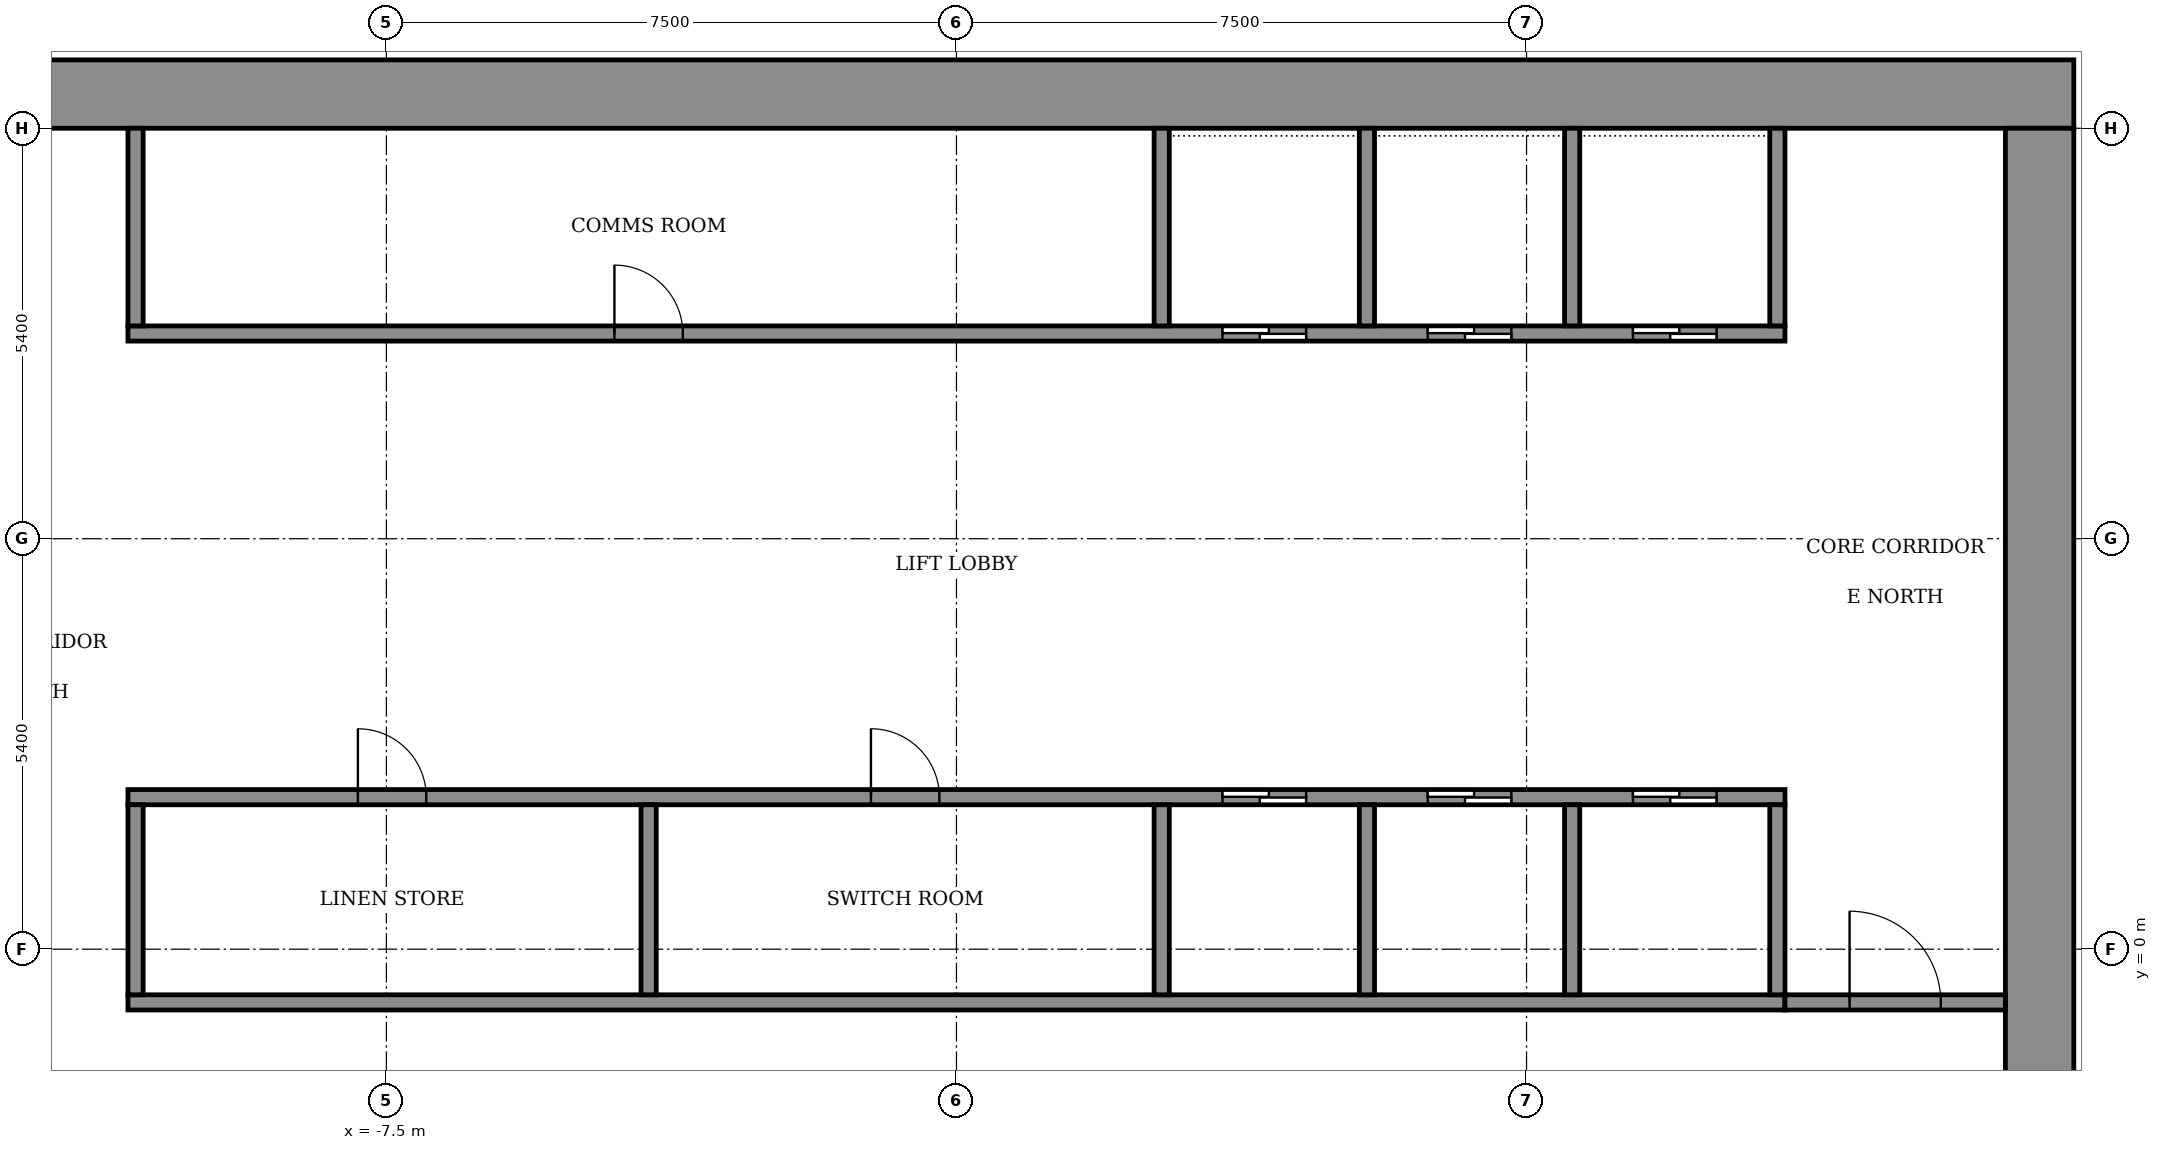
"""IFC4 building model, lengths in metres.
Left out: names, types, materials, properties, quantities, classifications, styles, units other than length and angle.
Written with IfcOpenShell. Run it as: python <this file> out.ifc"""

import sys

from ifc_helpers import new_model, si_unit, direction, frame, frame_2d, origin, place, context, subcontext, project, spatial, rectangle, extrude, element, fill, save


model = new_model("IFC4")
c1 = context("Model", 3, precision=1e-05, world=origin(), true_north=direction((0.0, 1.0)))
c2 = subcontext(c1, "Body", "Model", "MODEL_VIEW")
j1 = project(units=[si_unit("LENGTHUNIT", "METRE"), si_unit("PLANEANGLEUNIT", "RADIAN")], contexts=[c1])
p1 = place(None, origin())
s1 = spatial("IfcSite", under=j1, at=p1, CompositionType="ELEMENT")
p2 = place(p1, origin())
s2 = spatial("IfcBuilding", under=s1, at=p2, CompositionType="ELEMENT")
p3 = place(p2, frame((0.0, 0.0, 186.1)))
s3 = spatial("IfcBuildingStorey", under=s2, at=p3, CompositionType="ELEMENT", Elevation=186.1)
p4 = place(p3, frame((-14.7, 11.25, 0.0), z_axis=(0.0, 0.0, 1.0), x_axis=(1.0, 0.0, 0.0)))
e1 = element("IfcWall", 1, at=p4, inside=s3, PredefinedType="SHEAR", context=c2, shape_type="SweptSolid", body=[
    extrude(rectangle(XDim=29.4, YDim=0.9, at=frame_2d((14.7, 0.0))), origin(), (0.0, 0.0, 1.0), 3.6),
])
p5 = place(p3, frame((14.25, -10.8, 0.0), z_axis=(0.0, 0.0, 1.0), x_axis=(0.0, 1.0, 0.0)))
e2 = element("IfcWall", 2, at=p5, inside=s3, PredefinedType="SHEAR", context=c2, shape_type="SweptSolid", body=[
    extrude(rectangle(XDim=21.6, YDim=0.9, at=frame_2d((10.8, 0.0))), origin(), (0.0, 0.0, 1.0), 3.6),
])
p6 = place(p5, frame((1.2, 0.0, 0.0)))
e3 = element("IfcOpeningElement", 3, at=p6, cuts=e2, PredefinedType="OPENING", context=c2, shape_type="SweptSolid", body=[
    extrude(rectangle(XDim=1.2, YDim=2.1, at=frame_2d((0.6, 1.05))), frame((0.0, 0.46, 0.0), z_axis=(0.0, -1.0, 0.0), x_axis=(1.0, 0.0, 0.0)), (0.0, 0.0, 1.0), 0.92),
])
p7 = place(p3, frame((-10.9, -0.7, 0.0), z_axis=(0.0, 0.0, 1.0), x_axis=(1.0, 0.0, 0.0)))
e4 = element("IfcWall", 4, at=p7, inside=s3, PredefinedType="SHEAR", context=c2, shape_type="SweptSolid", body=[
    extrude(rectangle(XDim=21.8, YDim=0.2, at=frame_2d((10.9, 0.0))), origin(), (0.0, 0.0, 1.0), 3.05),
])
p8 = place(p3, frame((-10.9, 2.0, 0.0), z_axis=(0.0, 0.0, 1.0), x_axis=(1.0, 0.0, 0.0)))
e5 = element("IfcWall", 5, at=p8, inside=s3, PredefinedType="SHEAR", context=c2, shape_type="SweptSolid", body=[
    extrude(rectangle(XDim=21.8, YDim=0.2, at=frame_2d((10.9, 0.0))), origin(), (0.0, 0.0, 1.0), 3.05),
])
p9 = place(p8, frame((14.4, 0.0, 0.0)))
e6 = element("IfcOpeningElement", 6, at=p9, cuts=e5, PredefinedType="OPENING", context=c2, shape_type="SweptSolid", body=[
    extrude(rectangle(XDim=1.1, YDim=2.1, at=frame_2d((0.55, 1.05))), frame((0.0, 0.11, 0.0), z_axis=(0.0, -1.0, 0.0), x_axis=(1.0, 0.0, 0.0)), (0.0, 0.0, 1.0), 0.22),
])
p10 = place(p8, frame((17.1, 0.0, 0.0)))
e7 = element("IfcOpeningElement", 7, at=p10, cuts=e5, PredefinedType="OPENING", context=c2, shape_type="SweptSolid", body=[
    extrude(rectangle(XDim=1.1, YDim=2.1, at=frame_2d((0.55, 1.05))), frame((0.0, 0.11, 0.0), z_axis=(0.0, -1.0, 0.0), x_axis=(1.0, 0.0, 0.0)), (0.0, 0.0, 1.0), 0.22),
])
p11 = place(p8, frame((19.8, 0.0, 0.0)))
e8 = element("IfcOpeningElement", 8, at=p11, cuts=e5, PredefinedType="OPENING", context=c2, shape_type="SweptSolid", body=[
    extrude(rectangle(XDim=1.1, YDim=2.1, at=frame_2d((0.55, 1.05))), frame((0.0, 0.11, 0.0), z_axis=(0.0, -1.0, 0.0), x_axis=(1.0, 0.0, 0.0)), (0.0, 0.0, 1.0), 0.22),
])
p12 = place(p8, frame((3.025, 0.0, 0.0)))
e9 = element("IfcOpeningElement", 9, at=p12, cuts=e5, PredefinedType="OPENING", context=c2, shape_type="SweptSolid", body=[
    extrude(rectangle(XDim=0.9, YDim=2.1, at=frame_2d((0.45, 1.05))), frame((0.0, 0.11, 0.0), z_axis=(0.0, -1.0, 0.0), x_axis=(1.0, 0.0, 0.0)), (0.0, 0.0, 1.0), 0.22),
])
p13 = place(p8, frame((9.775, 0.0, 0.0)))
e10 = element("IfcOpeningElement", 10, at=p13, cuts=e5, PredefinedType="OPENING", context=c2, shape_type="SweptSolid", body=[
    extrude(rectangle(XDim=0.9, YDim=2.1, at=frame_2d((0.45, 1.05))), frame((0.0, 0.11, 0.0), z_axis=(0.0, -1.0, 0.0), x_axis=(1.0, 0.0, 0.0)), (0.0, 0.0, 1.0), 0.22),
])
p14 = place(p3, frame((-10.9, 8.1, 0.0), z_axis=(0.0, 0.0, 1.0), x_axis=(1.0, 0.0, 0.0)))
e11 = element("IfcWall", 11, at=p14, inside=s3, PredefinedType="SHEAR", context=c2, shape_type="SweptSolid", body=[
    extrude(rectangle(XDim=21.8, YDim=0.2, at=frame_2d((10.9, 0.0))), origin(), (0.0, 0.0, 1.0), 3.05),
])
p15 = place(p14, frame((14.4, 0.0, 0.0)))
e12 = element("IfcOpeningElement", 12, at=p15, cuts=e11, PredefinedType="OPENING", context=c2, shape_type="SweptSolid", body=[
    extrude(rectangle(XDim=1.1, YDim=2.1, at=frame_2d((0.55, 1.05))), frame((0.0, 0.11, 0.0), z_axis=(0.0, -1.0, 0.0), x_axis=(1.0, 0.0, 0.0)), (0.0, 0.0, 1.0), 0.22),
])
p16 = place(p14, frame((17.1, 0.0, 0.0)))
e13 = element("IfcOpeningElement", 13, at=p16, cuts=e11, PredefinedType="OPENING", context=c2, shape_type="SweptSolid", body=[
    extrude(rectangle(XDim=1.1, YDim=2.1, at=frame_2d((0.55, 1.05))), frame((0.0, 0.11, 0.0), z_axis=(0.0, -1.0, 0.0), x_axis=(1.0, 0.0, 0.0)), (0.0, 0.0, 1.0), 0.22),
])
p17 = place(p14, frame((19.8, 0.0, 0.0)))
e14 = element("IfcOpeningElement", 14, at=p17, cuts=e11, PredefinedType="OPENING", context=c2, shape_type="SweptSolid", body=[
    extrude(rectangle(XDim=1.1, YDim=2.1, at=frame_2d((0.55, 1.05))), frame((0.0, 0.11, 0.0), z_axis=(0.0, -1.0, 0.0), x_axis=(1.0, 0.0, 0.0)), (0.0, 0.0, 1.0), 0.22),
])
p18 = place(p14, frame((6.4, 0.0, 0.0)))
e15 = element("IfcOpeningElement", 15, at=p18, cuts=e11, PredefinedType="OPENING", context=c2, shape_type="SweptSolid", body=[
    extrude(rectangle(XDim=0.9, YDim=2.1, at=frame_2d((0.45, 1.05))), frame((0.0, 0.11, 0.0), z_axis=(0.0, -1.0, 0.0), x_axis=(1.0, 0.0, 0.0)), (0.0, 0.0, 1.0), 0.22),
])
for number, where, z_axis, x_axis in (
    (16, (-10.8, -0.6, 0.0), (0.0, 0.0, 1.0), (0.0, 1.0, 0.0)),
    (17, (-4.05, -0.6, 0.0), (0.0, 0.0, 1.0), (0.0, 1.0, 0.0)),
):
    element("IfcWall", number, at=place(p3, frame(where, z_axis=z_axis, x_axis=x_axis)), inside=s3, PredefinedType="STANDARD", context=c2, shape_type="SweptSolid", body=[
        extrude(rectangle(XDim=2.5, YDim=0.2, at=frame_2d((1.25, 0.0))), origin(), (0.0, 0.0, 1.0), 3.05),
    ])
for number, where, z_axis, x_axis in (
    (18, (2.7, -0.6, 0.0), (0.0, 0.0, 1.0), (0.0, 1.0, 0.0)),
    (19, (5.4, -0.6, 0.0), (0.0, 0.0, 1.0), (0.0, 1.0, 0.0)),
    (20, (8.1, -0.6, 0.0), (0.0, 0.0, 1.0), (0.0, 1.0, 0.0)),
    (21, (10.8, -0.6, 0.0), (0.0, 0.0, 1.0), (0.0, 1.0, 0.0)),
):
    element("IfcWall", number, at=place(p3, frame(where, z_axis=z_axis, x_axis=x_axis)), inside=s3, PredefinedType="SHEAR", context=c2, shape_type="SweptSolid", body=[
        extrude(rectangle(XDim=2.5, YDim=0.2, at=frame_2d((1.25, 0.0))), origin(), (0.0, 0.0, 1.0), 3.05),
    ])
p19 = place(p3, frame((-10.8, 8.2, 0.0), z_axis=(0.0, 0.0, 1.0), x_axis=(0.0, 1.0, 0.0)))
e22 = element("IfcWall", 22, at=p19, inside=s3, PredefinedType="STANDARD", context=c2, shape_type="SweptSolid", body=[
    extrude(rectangle(XDim=2.6, YDim=0.2, at=frame_2d((1.3, 0.0))), origin(), (0.0, 0.0, 1.0), 3.05),
])
for number, where, z_axis, x_axis in (
    (23, (2.7, 8.2, 0.0), (0.0, 0.0, 1.0), (0.0, 1.0, 0.0)),
    (24, (5.4, 8.2, 0.0), (0.0, 0.0, 1.0), (0.0, 1.0, 0.0)),
    (25, (8.1, 8.2, 0.0), (0.0, 0.0, 1.0), (0.0, 1.0, 0.0)),
    (26, (10.8, 8.2, 0.0), (0.0, 0.0, 1.0), (0.0, 1.0, 0.0)),
):
    element("IfcWall", number, at=place(p3, frame(where, z_axis=z_axis, x_axis=x_axis)), inside=s3, PredefinedType="SHEAR", context=c2, shape_type="SweptSolid", body=[
        extrude(rectangle(XDim=2.6, YDim=0.2, at=frame_2d((1.3, 0.0))), origin(), (0.0, 0.0, 1.0), 3.05),
    ])
p20 = place(p3, frame((10.9, -0.7, 0.0), z_axis=(0.0, 0.0, 1.0), x_axis=(1.0, 0.0, 0.0)))
e27 = element("IfcWall", 27, at=p20, inside=s3, PredefinedType="STANDARD", context=c2, shape_type="SweptSolid", body=[
    extrude(rectangle(XDim=2.9, YDim=0.2, at=frame_2d((1.45, 0.0))), origin(), (0.0, 0.0, 1.0), 3.05),
])
p21 = place(p20, frame((0.85, 0.0, 0.0)))
e28 = element("IfcOpeningElement", 28, at=p21, cuts=e27, PredefinedType="OPENING", context=c2, shape_type="SweptSolid", body=[
    extrude(rectangle(XDim=1.2, YDim=2.1, at=frame_2d((0.6, 1.05))), frame((0.0, 0.11, 0.0), z_axis=(0.0, -1.0, 0.0), x_axis=(1.0, 0.0, 0.0)), (0.0, 0.0, 1.0), 0.22),
])
p22 = place(p9, origin())
e29 = element("IfcDoor", 29, at=p22, inside=s3, OperationType="SLIDING_TO_LEFT", PredefinedType="DOOR", context=c2, shape_type="SweptSolid", body=[
    extrude(rectangle(XDim=1.1, YDim=2.1, at=frame_2d((0.55, 1.05))), frame((0.0, 0.025, 0.0), z_axis=(0.0, -1.0, 0.0), x_axis=(1.0, 0.0, 0.0)), (0.0, 0.0, 1.0), 0.05),
])
fill(e6, e29)
p23 = place(p10, origin())
e30 = element("IfcDoor", 30, at=p23, inside=s3, OperationType="SLIDING_TO_LEFT", PredefinedType="DOOR", context=c2, shape_type="SweptSolid", body=[
    extrude(rectangle(XDim=1.1, YDim=2.1, at=frame_2d((0.55, 1.05))), frame((0.0, 0.025, 0.0), z_axis=(0.0, -1.0, 0.0), x_axis=(1.0, 0.0, 0.0)), (0.0, 0.0, 1.0), 0.05),
])
fill(e7, e30)
p24 = place(p11, origin())
e31 = element("IfcDoor", 31, at=p24, inside=s3, OperationType="SLIDING_TO_LEFT", PredefinedType="DOOR", context=c2, shape_type="SweptSolid", body=[
    extrude(rectangle(XDim=1.1, YDim=2.1, at=frame_2d((0.55, 1.05))), frame((0.0, 0.025, 0.0), z_axis=(0.0, -1.0, 0.0), x_axis=(1.0, 0.0, 0.0)), (0.0, 0.0, 1.0), 0.05),
])
fill(e8, e31)
p25 = place(p15, origin())
e32 = element("IfcDoor", 32, at=p25, inside=s3, OperationType="SLIDING_TO_LEFT", PredefinedType="DOOR", context=c2, shape_type="SweptSolid", body=[
    extrude(rectangle(XDim=1.1, YDim=2.1, at=frame_2d((0.55, 1.05))), frame((0.0, 0.025, 0.0), z_axis=(0.0, -1.0, 0.0), x_axis=(1.0, 0.0, 0.0)), (0.0, 0.0, 1.0), 0.05),
])
fill(e12, e32)
p26 = place(p16, origin())
e33 = element("IfcDoor", 33, at=p26, inside=s3, OperationType="SLIDING_TO_LEFT", PredefinedType="DOOR", context=c2, shape_type="SweptSolid", body=[
    extrude(rectangle(XDim=1.1, YDim=2.1, at=frame_2d((0.55, 1.05))), frame((0.0, 0.025, 0.0), z_axis=(0.0, -1.0, 0.0), x_axis=(1.0, 0.0, 0.0)), (0.0, 0.0, 1.0), 0.05),
])
fill(e13, e33)
p27 = place(p17, origin())
e34 = element("IfcDoor", 34, at=p27, inside=s3, OperationType="SLIDING_TO_LEFT", PredefinedType="DOOR", context=c2, shape_type="SweptSolid", body=[
    extrude(rectangle(XDim=1.1, YDim=2.1, at=frame_2d((0.55, 1.05))), frame((0.0, 0.025, 0.0), z_axis=(0.0, -1.0, 0.0), x_axis=(1.0, 0.0, 0.0)), (0.0, 0.0, 1.0), 0.05),
])
fill(e14, e34)
p28 = place(p12, origin())
e35 = element("IfcDoor", 35, at=p28, inside=s3, OperationType="SINGLE_SWING_RIGHT", PredefinedType="DOOR", context=c2, shape_type="SweptSolid", body=[
    extrude(rectangle(XDim=0.9, YDim=2.1, at=frame_2d((0.45, 1.05))), frame((0.0, 0.025, 0.0), z_axis=(0.0, -1.0, 0.0), x_axis=(1.0, 0.0, 0.0)), (0.0, 0.0, 1.0), 0.05),
])
fill(e9, e35)
p29 = place(p13, origin())
e36 = element("IfcDoor", 36, at=p29, inside=s3, OperationType="SINGLE_SWING_LEFT", PredefinedType="DOOR", context=c2, shape_type="SweptSolid", body=[
    extrude(rectangle(XDim=0.9, YDim=2.1, at=frame_2d((0.45, 1.05))), frame((0.0, 0.025, 0.0), z_axis=(0.0, -1.0, 0.0), x_axis=(1.0, 0.0, 0.0)), (0.0, 0.0, 1.0), 0.05),
])
fill(e10, e36)
p30 = place(p18, origin())
e37 = element("IfcDoor", 37, at=p30, inside=s3, OperationType="SINGLE_SWING_LEFT", PredefinedType="DOOR", context=c2, shape_type="SweptSolid", body=[
    extrude(rectangle(XDim=0.9, YDim=2.1, at=frame_2d((0.45, 1.05))), frame((0.0, 0.025, 0.0), z_axis=(0.0, -1.0, 0.0), x_axis=(1.0, 0.0, 0.0)), (0.0, 0.0, 1.0), 0.05),
])
fill(e15, e37)
p31 = place(p21, origin())
e38 = element("IfcDoor", 38, at=p31, inside=s3, OperationType="SINGLE_SWING_LEFT", PredefinedType="DOOR", context=c2, shape_type="SweptSolid", body=[
    extrude(rectangle(XDim=1.2, YDim=2.1, at=frame_2d((0.6, 1.05))), frame((0.0, 0.025, 0.0), z_axis=(0.0, -1.0, 0.0), x_axis=(1.0, 0.0, 0.0)), (0.0, 0.0, 1.0), 0.05),
])
fill(e28, e38)
save(model, sys.argv[1])
